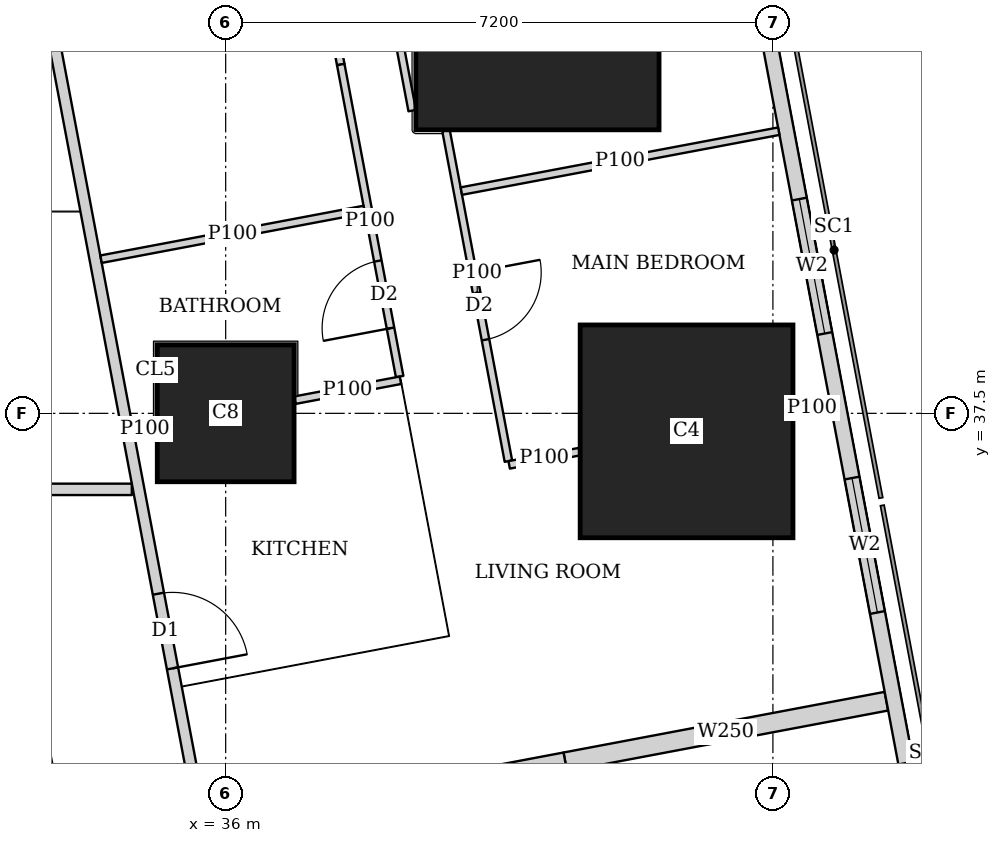
"""IFC4 building model, lengths in metres.
Left out: names, types, materials, properties, quantities, classifications, styles, units other than length and angle.
Written with IfcOpenShell. Run it as: python <this file> out.ifc"""

import sys

from ifc_helpers import new_model, si_unit, direction, frame, frame_2d, origin, origin_2d, place, context, subcontext, project, spatial, rectangle, extrude, element, fill, save


model = new_model("IFC4")
c1 = context("Model", 3, precision=1e-05, world=origin(), true_north=direction((0.0, 1.0)))
c2 = subcontext(c1, "Body", "Model", "MODEL_VIEW")
j1 = project(units=[si_unit("LENGTHUNIT", "METRE"), si_unit("PLANEANGLEUNIT", "RADIAN")], contexts=[c1])
p1 = place(None, origin())
s1 = spatial("IfcSite", under=j1, at=p1, CompositionType="ELEMENT")
p2 = place(p1, origin())
s2 = spatial("IfcBuilding", under=s1, at=p2, CompositionType="ELEMENT")
p3 = place(p2, frame((0.0, 0.0, 42.5)))
s3 = spatial("IfcBuildingStorey", under=s2, at=p3, CompositionType="ELEMENT", Elevation=42.5)
p4 = place(p3, frame((36.0, 37.5, 0.0), z_axis=(0.0, 0.0, 1.0), x_axis=(1.0, 0.0, 0.0)))
e1 = element("IfcColumn", 1, at=p4, inside=s3, PredefinedType="COLUMN", context=c2, shape_type="SweptSolid", body=[
    extrude(rectangle(XDim=1.8, YDim=1.8, at=origin_2d()), origin(), (0.0, 0.0, 1.0), 3.75),
])
p5 = place(p3, frame((42.064, 37.263, 0.0), z_axis=(0.0, 0.0, 1.0), x_axis=(1.0, 0.0, 0.0)))
e2 = element("IfcColumn", 2, at=p5, inside=s3, PredefinedType="COLUMN", context=c2, shape_type="SweptSolid", body=[
    extrude(rectangle(XDim=2.8, YDim=2.8, at=origin_2d()), origin(), (0.0, 0.0, 1.0), 3.75),
])
p6 = place(p3, frame((40.102, 42.83, 0.0), z_axis=(0.0, 0.0, 1.0), x_axis=(1.0, 0.0, 0.0)))
e3 = element("IfcColumn", 3, at=p6, inside=s3, PredefinedType="COLUMN", context=c2, shape_type="SweptSolid", body=[
    extrude(rectangle(XDim=3.2, YDim=3.2, at=origin_2d()), origin(), (0.0, 0.0, 1.0), 3.75),
])
p7 = place(p3, frame((50.653, 2.703, 0.0), z_axis=(0.0, 0.0, 1.0), x_axis=(-0.185612026696, 0.982623109613, 0.0)))
e4 = element("IfcWall", 4, at=p7, inside=s3, PredefinedType="SOLIDWALL", context=c2, shape_type="SweptSolid", body=[
    extrude(rectangle(XDim=41.393, YDim=0.2, at=frame_2d((20.697, 0.0))), origin(), (0.0, 0.0, 1.0), 3.5),
])
p8 = place(p7, frame((1.633, 0.0, 0.9)))
e5 = element("IfcOpeningElement", 5, at=p8, cuts=e4, PredefinedType="OPENING", context=c2, shape_type="SweptSolid", body=[
    extrude(rectangle(XDim=1.8, YDim=1.5, at=frame_2d((0.9, 0.75))), frame((0.0, 0.11, 0.0), z_axis=(0.0, -1.0, 0.0), x_axis=(1.0, 0.0, 0.0)), (0.0, 0.0, 1.0), 0.22),
])
p9 = place(p7, frame((6.032, 0.0, 0.9)))
e6 = element("IfcOpeningElement", 6, at=p9, cuts=e4, PredefinedType="OPENING", context=c2, shape_type="SweptSolid", body=[
    extrude(rectangle(XDim=1.8, YDim=1.5, at=frame_2d((0.9, 0.75))), frame((0.0, 0.11, 0.0), z_axis=(0.0, -1.0, 0.0), x_axis=(1.0, 0.0, 0.0)), (0.0, 0.0, 1.0), 0.22),
])
p10 = place(p7, frame((9.848, 0.0, 0.9)))
e7 = element("IfcOpeningElement", 7, at=p10, cuts=e4, PredefinedType="OPENING", context=c2, shape_type="SweptSolid", body=[
    extrude(rectangle(XDim=1.8, YDim=1.5, at=frame_2d((0.9, 0.75))), frame((0.0, 0.11, 0.0), z_axis=(0.0, -1.0, 0.0), x_axis=(1.0, 0.0, 0.0)), (0.0, 0.0, 1.0), 0.22),
])
p11 = place(p7, frame((17.481, 0.0, 0.9)))
e8 = element("IfcOpeningElement", 8, at=p11, cuts=e4, PredefinedType="OPENING", context=c2, shape_type="SweptSolid", body=[
    extrude(rectangle(XDim=1.8, YDim=1.5, at=frame_2d((0.9, 0.75))), frame((0.0, 0.11, 0.0), z_axis=(0.0, -1.0, 0.0), x_axis=(1.0, 0.0, 0.0)), (0.0, 0.0, 1.0), 0.22),
])
p12 = place(p7, frame((21.297, 0.0, 0.9)))
e9 = element("IfcOpeningElement", 9, at=p12, cuts=e4, PredefinedType="OPENING", context=c2, shape_type="SweptSolid", body=[
    extrude(rectangle(XDim=1.8, YDim=1.5, at=frame_2d((0.9, 0.75))), frame((0.0, 0.11, 0.0), z_axis=(0.0, -1.0, 0.0), x_axis=(1.0, 0.0, 0.0)), (0.0, 0.0, 1.0), 0.22),
])
p13 = place(p7, frame((25.113, 0.0, 0.9)))
e10 = element("IfcOpeningElement", 10, at=p13, cuts=e4, PredefinedType="OPENING", context=c2, shape_type="SweptSolid", body=[
    extrude(rectangle(XDim=1.8, YDim=1.5, at=frame_2d((0.9, 0.75))), frame((0.0, 0.11, 0.0), z_axis=(0.0, -1.0, 0.0), x_axis=(1.0, 0.0, 0.0)), (0.0, 0.0, 1.0), 0.22),
])
p14 = place(p7, frame((28.93, 0.0, 0.9)))
e11 = element("IfcOpeningElement", 11, at=p14, cuts=e4, PredefinedType="OPENING", context=c2, shape_type="SweptSolid", body=[
    extrude(rectangle(XDim=1.8, YDim=1.5, at=frame_2d((0.9, 0.75))), frame((0.0, 0.11, 0.0), z_axis=(0.0, -1.0, 0.0), x_axis=(1.0, 0.0, 0.0)), (0.0, 0.0, 1.0), 0.22),
])
p15 = place(p7, frame((32.746, 0.0, 0.9)))
e12 = element("IfcOpeningElement", 12, at=p15, cuts=e4, PredefinedType="OPENING", context=c2, shape_type="SweptSolid", body=[
    extrude(rectangle(XDim=1.8, YDim=1.5, at=frame_2d((0.9, 0.75))), frame((0.0, 0.11, 0.0), z_axis=(0.0, -1.0, 0.0), x_axis=(1.0, 0.0, 0.0)), (0.0, 0.0, 1.0), 0.22),
])
p16 = place(p7, frame((36.481, 0.0, 0.9)))
e13 = element("IfcOpeningElement", 13, at=p16, cuts=e4, PredefinedType="OPENING", context=c2, shape_type="SweptSolid", body=[
    extrude(rectangle(XDim=1.8, YDim=1.5, at=frame_2d((0.9, 0.75))), frame((0.0, 0.11, 0.0), z_axis=(0.0, -1.0, 0.0), x_axis=(1.0, 0.0, 0.0)), (0.0, 0.0, 1.0), 0.22),
])
p17 = place(p3, frame((8.35, 36.5, 0.0), z_axis=(0.0, 0.0, 1.0), x_axis=(1.0, 0.0, 0.0)))
e14 = element("IfcWall", 14, at=p17, inside=s3, PredefinedType="SOLIDWALL", context=c2, shape_type="SweptSolid", body=[
    extrude(rectangle(XDim=26.415, YDim=0.15, at=frame_2d((13.208, 0.0))), origin(), (0.0, 0.0, 1.0), 3.5),
])
p18 = place(p17, frame((3.383, 0.0, 0.0)))
e15 = element("IfcOpeningElement", 15, at=p18, cuts=e14, PredefinedType="OPENING", context=c2, shape_type="SweptSolid", body=[
    extrude(rectangle(XDim=1.0, YDim=2.1, at=frame_2d((0.5, 1.05))), frame((0.0, 0.085, 0.0), z_axis=(0.0, -1.0, 0.0), x_axis=(1.0, 0.0, 0.0)), (0.0, 0.0, 1.0), 0.17),
])
p19 = place(p17, frame((7.65, 0.0, 0.0)))
e16 = element("IfcOpeningElement", 16, at=p19, cuts=e14, PredefinedType="OPENING", context=c2, shape_type="SweptSolid", body=[
    extrude(rectangle(XDim=1.0, YDim=2.1, at=frame_2d((0.5, 1.05))), frame((0.0, 0.085, 0.0), z_axis=(0.0, -1.0, 0.0), x_axis=(1.0, 0.0, 0.0)), (0.0, 0.0, 1.0), 0.17),
])
p20 = place(p17, frame((14.85, 0.0, 0.0)))
e17 = element("IfcOpeningElement", 17, at=p20, cuts=e14, PredefinedType="OPENING", context=c2, shape_type="SweptSolid", body=[
    extrude(rectangle(XDim=1.0, YDim=2.1, at=frame_2d((0.5, 1.05))), frame((0.0, 0.085, 0.0), z_axis=(0.0, -1.0, 0.0), x_axis=(1.0, 0.0, 0.0)), (0.0, 0.0, 1.0), 0.17),
])
p21 = place(p17, frame((23.923, 0.0, 0.0)))
e18 = element("IfcOpeningElement", 18, at=p21, cuts=e14, PredefinedType="OPENING", context=c2, shape_type="SweptSolid", body=[
    extrude(rectangle(XDim=1.0, YDim=2.1, at=frame_2d((0.5, 1.05))), frame((0.0, 0.085, 0.0), z_axis=(0.0, -1.0, 0.0), x_axis=(1.0, 0.0, 0.0)), (0.0, 0.0, 1.0), 0.17),
])
p22 = place(p3, frame((33.68, 42.723, 0.0), z_axis=(0.0, 0.0, 1.0), x_axis=(0.185624129307, -0.98262082342, 0.0)))
e19 = element("IfcWall", 19, at=p22, inside=s3, PredefinedType="SOLIDWALL", context=c2, shape_type="SweptSolid", body=[
    extrude(rectangle(XDim=41.051, YDim=0.15, at=frame_2d((20.526, 0.0))), origin(), (0.0, 0.0, 1.0), 2.5),
])
p23 = place(p22, frame((7.73, 0.0, 0.0)))
e20 = element("IfcOpeningElement", 20, at=p23, cuts=e19, PredefinedType="OPENING", context=c2, shape_type="SweptSolid", body=[
    extrude(rectangle(XDim=1.0, YDim=2.1, at=frame_2d((0.5, 1.05))), frame((0.0, 0.085, 0.0), z_axis=(0.0, -1.0, 0.0), x_axis=(1.0, 0.0, 0.0)), (0.0, 0.0, 1.0), 0.17),
])
p24 = place(p22, frame((12.307, 0.0, 0.0)))
e21 = element("IfcOpeningElement", 21, at=p24, cuts=e19, PredefinedType="OPENING", context=c2, shape_type="SweptSolid", body=[
    extrude(rectangle(XDim=1.0, YDim=2.1, at=frame_2d((0.5, 1.05))), frame((0.0, 0.085, 0.0), z_axis=(0.0, -1.0, 0.0), x_axis=(1.0, 0.0, 0.0)), (0.0, 0.0, 1.0), 0.17),
])
p25 = place(p22, frame((19.938, 0.0, 0.0)))
e22 = element("IfcOpeningElement", 22, at=p25, cuts=e19, PredefinedType="OPENING", context=c2, shape_type="SweptSolid", body=[
    extrude(rectangle(XDim=1.0, YDim=2.1, at=frame_2d((0.5, 1.05))), frame((0.0, 0.085, 0.0), z_axis=(0.0, -1.0, 0.0), x_axis=(1.0, 0.0, 0.0)), (0.0, 0.0, 1.0), 0.17),
])
p26 = place(p22, frame((32.193, 0.0, 0.0)))
e23 = element("IfcOpeningElement", 23, at=p26, cuts=e19, PredefinedType="OPENING", context=c2, shape_type="SweptSolid", body=[
    extrude(rectangle(XDim=1.0, YDim=2.1, at=frame_2d((0.5, 1.05))), frame((0.0, 0.085, 0.0), z_axis=(0.0, -1.0, 0.0), x_axis=(1.0, 0.0, 0.0)), (0.0, 0.0, 1.0), 0.17),
])
p27 = place(p3, frame((38.454, 41.483, 0.0), z_axis=(0.0, 0.0, 1.0), x_axis=(-0.185609245326, 0.982623634994, 0.0)))
e24 = element("IfcWall", 24, at=p27, inside=s3, PredefinedType="PARTITIONING", context=c2, shape_type="SweptSolid", body=[
    extrude(rectangle(XDim=4.241, YDim=0.1, at=frame_2d((2.12, 0.0))), origin(), (0.0, 0.0, 1.0), 2.05),
])
p28 = place(p3, frame((38.899, 41.22, 0.0), z_axis=(0.0, 0.0, 1.0), x_axis=(0.185517409072, -0.982640977637, 0.0)))
e25 = element("IfcWall", 25, at=p28, inside=s3, PredefinedType="PARTITIONING", context=c2, shape_type="SweptSolid", body=[
    extrude(rectangle(XDim=4.426, YDim=0.1, at=frame_2d((2.213, 0.0))), origin(), (0.0, 0.0, 1.0), 3.5),
])
p29 = place(p28, frame((1.9, 0.0, 0.0)))
e26 = element("IfcOpeningElement", 26, at=p29, cuts=e25, PredefinedType="OPENING", context=c2, shape_type="SweptSolid", body=[
    extrude(rectangle(XDim=0.9, YDim=2.1, at=frame_2d((0.45, 1.05))), frame((0.0, 0.06, 0.0), z_axis=(0.0, -1.0, 0.0), x_axis=(1.0, 0.0, 0.0)), (0.0, 0.0, 1.0), 0.12),
])
p30 = place(p3, frame((37.417, 42.602, 0.0), z_axis=(0.0, 0.0, 1.0), x_axis=(0.185672001976, -0.982611778721, 0.0)))
e27 = element("IfcWall", 27, at=p30, inside=s3, PredefinedType="PARTITIONING", context=c2, shape_type="SweptSolid", body=[
    extrude(rectangle(XDim=0.522, YDim=0.1, at=frame_2d((0.261, 0.0))), origin(), (0.0, 0.0, 1.0), 2.05),
])
p31 = place(p3, frame((37.514, 42.089, 0.0), z_axis=(0.0, 0.0, 1.0), x_axis=(0.185540945282, -0.982636533833, 0.0)))
e28 = element("IfcWall", 28, at=p31, inside=s3, PredefinedType="PARTITIONING", context=c2, shape_type="SweptSolid", body=[
    extrude(rectangle(XDim=4.178, YDim=0.1, at=frame_2d((2.089, 0.0))), origin(), (0.0, 0.0, 1.0), 3.5),
])
p32 = place(p31, frame((2.63, 0.0, 0.0)))
e29 = element("IfcOpeningElement", 29, at=p32, cuts=e28, PredefinedType="OPENING", context=c2, shape_type="SweptSolid", body=[
    extrude(rectangle(XDim=0.9, YDim=2.1, at=frame_2d((0.45, 1.05))), frame((0.0, 0.06, 0.0), z_axis=(0.0, -1.0, 0.0), x_axis=(1.0, 0.0, 0.0)), (0.0, 0.0, 1.0), 0.12),
])
p33 = place(p3, frame((43.277, 41.212, 0.0), z_axis=(0.0, 0.0, 1.0), x_axis=(-0.982665405803, -0.185387972203, 0.0)))
e30 = element("IfcWall", 30, at=p33, inside=s3, PredefinedType="PARTITIONING", context=c2, shape_type="SweptSolid", body=[
    extrude(rectangle(XDim=4.25, YDim=0.1, at=frame_2d((2.125, 0.0))), origin(), (0.0, 0.0, 1.0), 2.05),
])
p34 = place(p3, frame((43.955, 37.62, 0.0), z_axis=(0.0, 0.0, 1.0), x_axis=(-0.982543152073, -0.186034820164, 0.0)))
e31 = element("IfcWall", 31, at=p34, inside=s3, PredefinedType="PARTITIONING", context=c2, shape_type="SweptSolid", body=[
    extrude(rectangle(XDim=0.49, YDim=0.1, at=frame_2d((0.245, 0.0))), origin(), (0.0, 0.0, 1.0), 3.5),
])
p35 = place(p3, frame((40.654, 36.996, 0.0), z_axis=(0.0, 0.0, 1.0), x_axis=(-0.982716055164, -0.185119299163, 0.0)))
e32 = element("IfcWall", 32, at=p35, inside=s3, PredefinedType="PARTITIONING", context=c2, shape_type="SweptSolid", body=[
    extrude(rectangle(XDim=0.94, YDim=0.1, at=frame_2d((0.47, 0.0))), origin(), (0.0, 0.0, 1.0), 3.5),
])
p36 = place(p3, frame((37.823, 40.182, 0.0), z_axis=(0.0, 0.0, 1.0), x_axis=(-0.98263926043, -0.185526504472, 0.0)))
e33 = element("IfcWall", 33, at=p36, inside=s3, PredefinedType="PARTITIONING", context=c2, shape_type="SweptSolid", body=[
    extrude(rectangle(XDim=3.524, YDim=0.1, at=frame_2d((1.762, 0.0))), origin(), (0.0, 0.0, 1.0), 3.5),
])
p37 = place(p3, frame((38.299, 37.935, 0.0), z_axis=(0.0, 0.0, 1.0), x_axis=(-0.982680053146, -0.185310315822, 0.0)))
e34 = element("IfcWall", 34, at=p37, inside=s3, PredefinedType="PARTITIONING", context=c2, shape_type="SweptSolid", body=[
    extrude(rectangle(XDim=1.414, YDim=0.1, at=frame_2d((0.707, 0.0))), origin(), (0.0, 0.0, 1.0), 3.5),
])
p38 = place(p3, frame((35.09, 37.328, 0.0), z_axis=(0.0, 0.0, 1.0), x_axis=(-0.982961380226, -0.183812200315, 0.0)))
e35 = element("IfcWall", 35, at=p38, inside=s3, PredefinedType="PARTITIONING", context=c2, shape_type="SweptSolid", body=[
    extrude(rectangle(XDim=0.31, YDim=0.1, at=frame_2d((0.155, 0.0))), origin(), (0.0, 0.0, 1.0), 3.5),
])
p39 = place(p3, frame((44.693, 33.713, 0.0), z_axis=(0.0, 0.0, 1.0), x_axis=(-0.982633535512, -0.185556823879, 0.0)))
e36 = element("IfcWall", 36, at=p39, inside=s3, PredefinedType="SOLIDWALL", context=c2, shape_type="SweptSolid", body=[
    extrude(rectangle(XDim=4.3, YDim=0.25, at=frame_2d((2.15, 0.0))), origin(), (0.0, 0.0, 1.0), 2.05),
])
p40 = place(p3, frame((40.468, 32.915, 0.0), z_axis=(0.0, 0.0, 1.0), x_axis=(-0.982635807605, -0.185544791394, 0.0)))
e37 = element("IfcWall", 37, at=p40, inside=s3, PredefinedType="SOLIDWALL", context=c2, shape_type="SweptSolid", body=[
    extrude(rectangle(XDim=4.775, YDim=0.25, at=frame_2d((2.388, 0.0))), origin(), (0.0, 0.0, 1.0), 3.5),
])
p41 = place(p3, frame((36.861, 15.913, 0.0), z_axis=(0.0, 0.0, 1.0), x_axis=(-0.185588307143, 0.982627589808, 0.0)))
e38 = element("IfcWall", 38, at=p41, inside=s3, PredefinedType="PARTITIONING", context=c2, shape_type="SweptSolid", body=[
    extrude(rectangle(XDim=19.005, YDim=0.125, at=frame_2d((9.502, 0.0))), origin(), (0.0, 0.0, 1.0), 2.5),
])
p42 = place(p41, frame((0.25, 0.0, 0.0)))
e39 = element("IfcOpeningElement", 39, at=p42, cuts=e38, PredefinedType="OPENING", context=c2, shape_type="SweptSolid", body=[
    extrude(rectangle(XDim=1.0, YDim=2.1, at=frame_2d((0.5, 1.05))), frame((0.0, 0.073, 0.0), z_axis=(0.0, -1.0, 0.0), x_axis=(1.0, 0.0, 0.0)), (0.0, 0.0, 1.0), 0.145),
])
p43 = place(p41, frame((7.527, 0.0, 0.0)))
e40 = element("IfcOpeningElement", 40, at=p43, cuts=e38, PredefinedType="OPENING", context=c2, shape_type="SweptSolid", body=[
    extrude(rectangle(XDim=1.0, YDim=2.1, at=frame_2d((0.5, 1.05))), frame((0.0, 0.073, 0.0), z_axis=(0.0, -1.0, 0.0), x_axis=(1.0, 0.0, 0.0)), (0.0, 0.0, 1.0), 0.145),
])
p44 = place(p41, frame((15.5, 0.0, 0.0)))
e41 = element("IfcOpeningElement", 41, at=p44, cuts=e38, PredefinedType="OPENING", context=c2, shape_type="SweptSolid", body=[
    extrude(rectangle(XDim=1.0, YDim=2.1, at=frame_2d((0.5, 1.05))), frame((0.0, 0.073, 0.0), z_axis=(0.0, -1.0, 0.0), x_axis=(1.0, 0.0, 0.0)), (0.0, 0.0, 1.0), 0.145),
])
p45 = place(p14, origin())
e42 = element("IfcWindow", 42, at=p45, inside=s3, PartitioningType="SINGLE_PANEL", PredefinedType="WINDOW", context=c2, shape_type="SweptSolid", body=[
    extrude(rectangle(XDim=1.8, YDim=1.5, at=frame_2d((0.9, 0.75))), frame((0.0, 0.03, 0.0), z_axis=(0.0, -1.0, 0.0), x_axis=(1.0, 0.0, 0.0)), (0.0, 0.0, 1.0), 0.06),
])
fill(e11, e42)
p46 = place(p15, origin())
e43 = element("IfcWindow", 43, at=p46, inside=s3, PartitioningType="SINGLE_PANEL", PredefinedType="WINDOW", context=c2, shape_type="SweptSolid", body=[
    extrude(rectangle(XDim=1.8, YDim=1.5, at=frame_2d((0.9, 0.75))), frame((0.0, 0.03, 0.0), z_axis=(0.0, -1.0, 0.0), x_axis=(1.0, 0.0, 0.0)), (0.0, 0.0, 1.0), 0.06),
])
fill(e12, e43)
p47 = place(p16, origin())
e44 = element("IfcWindow", 44, at=p47, inside=s3, PartitioningType="SINGLE_PANEL", PredefinedType="WINDOW", context=c2, shape_type="SweptSolid", body=[
    extrude(rectangle(XDim=1.8, YDim=1.5, at=frame_2d((0.9, 0.75))), frame((0.0, 0.03, 0.0), z_axis=(0.0, -1.0, 0.0), x_axis=(1.0, 0.0, 0.0)), (0.0, 0.0, 1.0), 0.06),
])
fill(e13, e44)
p48 = place(p29, origin())
e45 = element("IfcDoor", 45, at=p48, inside=s3, OperationType="SINGLE_SWING_LEFT", PredefinedType="DOOR", context=c2, shape_type="SweptSolid", body=[
    extrude(rectangle(XDim=0.9, YDim=2.1, at=frame_2d((0.45, 1.05))), frame((0.0, 0.025, 0.0), z_axis=(0.0, -1.0, 0.0), x_axis=(1.0, 0.0, 0.0)), (0.0, 0.0, 1.0), 0.05),
])
fill(e26, e45)
p49 = place(p32, origin())
e46 = element("IfcDoor", 46, at=p49, inside=s3, OperationType="SINGLE_SWING_LEFT", PredefinedType="DOOR", context=c2, shape_type="SweptSolid", body=[
    extrude(rectangle(XDim=0.9, YDim=2.1, at=frame_2d((0.45, 1.05))), frame((0.0, 0.025, 0.0), z_axis=(0.0, -1.0, 0.0), x_axis=(1.0, 0.0, 0.0)), (0.0, 0.0, 1.0), 0.05),
])
fill(e29, e46)
p50 = place(p23, origin())
e47 = element("IfcDoor", 47, at=p50, inside=s3, OperationType="SINGLE_SWING_RIGHT", PredefinedType="DOOR", context=c2, shape_type="SweptSolid", body=[
    extrude(rectangle(XDim=1.0, YDim=2.1, at=frame_2d((0.5, 1.05))), frame((0.0, 0.025, 0.0), z_axis=(0.0, -1.0, 0.0), x_axis=(1.0, 0.0, 0.0)), (0.0, 0.0, 1.0), 0.05),
])
fill(e20, e47)
save(model, sys.argv[1])
